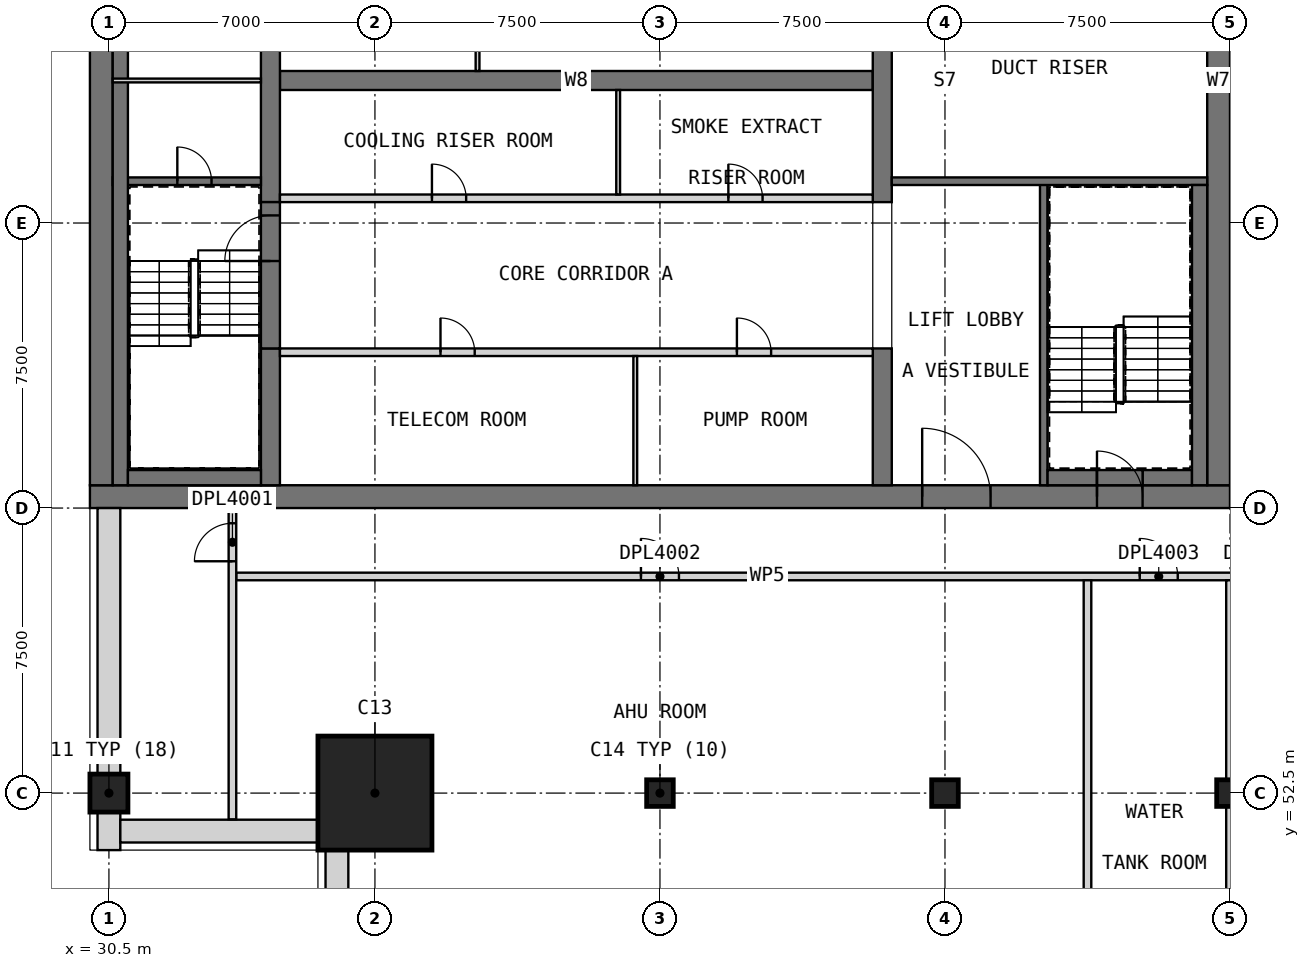
"""IFC4 building model, lengths in metres.
Left out: names, types, materials, properties, quantities, classifications, styles, units other than length and angle.
Written with IfcOpenShell. Run it as: python <this file> out.ifc"""

import sys

from ifc_helpers import new_model, si_unit, direction, frame, frame_2d, origin, origin_2d, place, context, subcontext, project, spatial, rectangle, extrude, element, fill, save


model = new_model("IFC4")
c1 = context("Model", 3, precision=1e-05, world=origin(), true_north=direction((0.0, 1.0)))
c2 = subcontext(c1, "Body", "Model", "MODEL_VIEW")
j1 = project(units=[si_unit("LENGTHUNIT", "METRE"), si_unit("PLANEANGLEUNIT", "RADIAN")], contexts=[c1])
p1 = place(None, origin())
s1 = spatial("IfcSite", under=j1, at=p1, CompositionType="ELEMENT")
p2 = place(p1, origin())
s2 = spatial("IfcBuilding", under=s1, at=p2, CompositionType="ELEMENT")
p3 = place(p2, frame((0.0, 0.0, 314.7)))
s3 = spatial("IfcBuildingStorey", under=s2, at=p3, CompositionType="ELEMENT", Elevation=314.7)
p4 = place(p3, frame((30.5, 52.5, 0.0), z_axis=(0.0, 0.0, 1.0), x_axis=(1.0, 0.0, 0.0)))
e1 = element("IfcColumn", 1, at=p4, inside=s3, PredefinedType="COLUMN", context=c2, shape_type="SweptSolid", body=[
    extrude(rectangle(XDim=1.0, YDim=1.0, at=origin_2d()), origin(), (0.0, 0.0, 1.0), 5.5),
])
for number, where, z_axis, x_axis in (
    (2, (45.0, 52.5, 0.0), (0.0, 0.0, 1.0), (1.0, 0.0, 0.0)),
    (3, (52.5, 52.5, 0.0), (0.0, 0.0, 1.0), (1.0, 0.0, 0.0)),
    (4, (60.0, 52.5, 0.0), (0.0, 0.0, 1.0), (1.0, 0.0, 0.0)),
):
    element("IfcColumn", number, at=place(p3, frame(where, z_axis=z_axis, x_axis=x_axis)), inside=s3, PredefinedType="COLUMN", context=c2, shape_type="SweptSolid", body=[
        extrude(rectangle(XDim=0.7, YDim=0.7, at=origin_2d()), origin(), (0.0, 0.0, 1.0), 5.5),
    ])
p5 = place(p3, frame((37.5, 52.5, 0.0), z_axis=(0.0, 0.0, 1.0), x_axis=(1.0, 0.0, 0.0)))
e5 = element("IfcColumn", 5, at=p5, inside=s3, PredefinedType="COLUMN", context=c2, shape_type="SweptSolid", body=[
    extrude(rectangle(XDim=3.0, YDim=3.0, at=origin_2d()), origin(), (0.0, 0.0, 1.0), 5.5),
])
p6 = place(p3, frame((30.0, 60.3, 0.0), z_axis=(0.0, 0.0, 1.0), x_axis=(1.0, 0.0, 0.0)))
e6 = element("IfcWall", 6, at=p6, inside=s3, PredefinedType="SHEAR", context=c2, shape_type="SweptSolid", body=[
    extrude(rectangle(XDim=30.0, YDim=0.6, at=frame_2d((15.0, 0.0))), origin(), (0.0, 0.0, 1.0), 5.5),
])
p7 = place(p6, frame((21.9, 0.0, 0.0)))
e7 = element("IfcOpeningElement", 7, at=p7, cuts=e6, PredefinedType="OPENING", context=c2, shape_type="SweptSolid", body=[
    extrude(rectangle(XDim=1.8, YDim=2.1, at=frame_2d((0.9, 1.05))), frame((0.0, 0.31, 0.0), z_axis=(0.0, -1.0, 0.0), x_axis=(1.0, 0.0, 0.0)), (0.0, 0.0, 1.0), 0.62),
])
p8 = place(p6, frame((26.5, 0.0, 0.0)))
e8 = element("IfcOpeningElement", 8, at=p8, cuts=e6, PredefinedType="OPENING", context=c2, shape_type="SweptSolid", body=[
    extrude(rectangle(XDim=1.2, YDim=2.1, at=frame_2d((0.6, 1.05))), frame((0.0, 0.31, 0.0), z_axis=(0.0, -1.0, 0.0), x_axis=(1.0, 0.0, 0.0)), (0.0, 0.0, 1.0), 0.62),
])
p9 = place(p3, frame((30.3, 60.6, 0.0), z_axis=(0.0, 0.0, 1.0), x_axis=(0.0, 1.0, 0.0)))
e9 = element("IfcWall", 9, at=p9, inside=s3, PredefinedType="SHEAR", context=c2, shape_type="SweptSolid", body=[
    extrude(rectangle(XDim=21.3, YDim=0.6, at=frame_2d((10.65, 0.0))), origin(), (0.0, 0.0, 1.0), 5.5),
])
p10 = place(p3, frame((59.7, 60.6, 0.0), z_axis=(0.0, 0.0, 1.0), x_axis=(0.0, 1.0, 0.0)))
e10 = element("IfcWall", 10, at=p10, inside=s3, PredefinedType="SHEAR", context=c2, shape_type="SweptSolid", body=[
    extrude(rectangle(XDim=21.3, YDim=0.6, at=frame_2d((10.65, 0.0))), origin(), (0.0, 0.0, 1.0), 5.5),
])
p11 = place(p10, frame((14.9, 0.0, 0.0)))
e11 = element("IfcOpeningElement", 11, at=p11, cuts=e10, PredefinedType="OPENING", context=c2, shape_type="SweptSolid", body=[
    extrude(rectangle(XDim=1.8, YDim=2.1, at=frame_2d((0.9, 1.05))), frame((0.0, 0.31, 0.0), z_axis=(0.0, -1.0, 0.0), x_axis=(1.0, 0.0, 0.0)), (0.0, 0.0, 1.0), 0.62),
])
p12 = place(p3, frame((35.0, 71.25, 0.0), z_axis=(0.0, 0.0, 1.0), x_axis=(1.0, 0.0, 0.0)))
e12 = element("IfcWall", 12, at=p12, inside=s3, PredefinedType="SHEAR", context=c2, shape_type="SweptSolid", body=[
    extrude(rectangle(XDim=15.6, YDim=0.5, at=frame_2d((7.8, 0.0))), origin(), (0.0, 0.0, 1.0), 5.5),
])
p13 = place(p3, frame((34.75, 60.6, 0.0), z_axis=(0.0, 0.0, 1.0), x_axis=(0.0, 1.0, 0.0)))
e13 = element("IfcWall", 13, at=p13, inside=s3, PredefinedType="SHEAR", context=c2, shape_type="SweptSolid", body=[
    extrude(rectangle(XDim=3.6, YDim=0.5, at=frame_2d((1.8, 0.0))), origin(), (0.0, 0.0, 1.0), 5.5),
])
p14 = place(p3, frame((34.75, 68.05, 0.0), z_axis=(0.0, 0.0, 1.0), x_axis=(0.0, 1.0, 0.0)))
e14 = element("IfcWall", 14, at=p14, inside=s3, PredefinedType="SHEAR", context=c2, shape_type="SweptSolid", body=[
    extrude(rectangle(XDim=6.4, YDim=0.5, at=frame_2d((3.2, 0.0))), origin(), (0.0, 0.0, 1.0), 5.5),
])
p15 = place(p3, frame((50.85, 60.6, 0.0), z_axis=(0.0, 0.0, 1.0), x_axis=(0.0, 1.0, 0.0)))
e15 = element("IfcWall", 15, at=p15, inside=s3, PredefinedType="SHEAR", context=c2, shape_type="SweptSolid", body=[
    extrude(rectangle(XDim=3.6, YDim=0.5, at=frame_2d((1.8, 0.0))), origin(), (0.0, 0.0, 1.0), 5.5),
])
p16 = place(p3, frame((50.85, 68.05, 0.0), z_axis=(0.0, 0.0, 1.0), x_axis=(0.0, 1.0, 0.0)))
e16 = element("IfcWall", 16, at=p16, inside=s3, PredefinedType="SHEAR", context=c2, shape_type="SweptSolid", body=[
    extrude(rectangle(XDim=6.4, YDim=0.5, at=frame_2d((3.2, 0.0))), origin(), (0.0, 0.0, 1.0), 5.5),
])
p17 = place(p2, frame((0.0, 0.0, 34.0)))
s4 = spatial("IfcBuildingStorey", under=s2, at=p17, CompositionType="ELEMENT", Elevation=34.0)
for number, where, z_axis, x_axis in (
    (17, (29.7, 61.05, 0.0), (0.0, 0.0, 1.0), (0.0, 1.0, 0.0)),
    (18, (29.7, 65.925, 0.0), (0.0, 0.0, 1.0), (0.0, 1.0, 0.0)),
    (19, (29.7, 70.8, 0.0), (0.0, 0.0, 1.0), (0.0, 1.0, 0.0)),
):
    element("IfcWall", number, at=place(p17, frame(where, z_axis=z_axis, x_axis=x_axis)), inside=s4, PredefinedType="SOLIDWALL", context=c2, shape_type="SweptSolid", body=[
        extrude(rectangle(XDim=0.9, YDim=0.6, at=frame_2d((0.45, 0.0))), origin(), (0.0, 0.0, 1.0), 286.2),
    ])
p18 = place(p3, frame((30.5, 60.0, 0.0), z_axis=(0.0, 0.0, 1.0), x_axis=(0.0, -1.0, 0.0)))
e20 = element("IfcWall", 20, at=p18, inside=s3, PredefinedType="ELEMENTEDWALL", context=c2, shape_type="SweptSolid", body=[
    extrude(rectangle(XDim=7.0, YDim=0.6, at=frame_2d((3.5, 0.0))), origin(), (0.0, 0.0, 1.0), 5.1),
])
p19 = place(p3, frame((30.5, 52.0, 0.0), z_axis=(0.0, 0.0, 1.0), x_axis=(0.0, -1.0, 0.0)))
e21 = element("IfcWall", 21, at=p19, inside=s3, PredefinedType="ELEMENTEDWALL", context=c2, shape_type="SweptSolid", body=[
    extrude(rectangle(XDim=1.0, YDim=0.6, at=frame_2d((0.5, 0.0))), origin(), (0.0, 0.0, 1.0), 5.1),
])
for number, where, z_axis, x_axis in (
    (22, (30.8, 51.5, 0.0), (0.0, 0.0, 1.0), (1.0, 0.0, 0.0)),
    (23, (36.5, 51.0, 0.0), (0.0, 0.0, 1.0), (0.0, -1.0, 0.0)),
):
    element("IfcWall", number, at=place(p3, frame(where, z_axis=z_axis, x_axis=x_axis)), inside=s3, PredefinedType="ELEMENTEDWALL", context=c2, shape_type="SweptSolid", body=[
        extrude(rectangle(XDim=5.2, YDim=0.6, at=frame_2d((2.6, 0.0))), origin(), (0.0, 0.0, 1.0), 5.1),
    ])
p20 = place(p3, frame((35.0, 64.1, 0.0), z_axis=(0.0, 0.0, 1.0), x_axis=(1.0, 0.0, 0.0)))
e24 = element("IfcWall", 24, at=p20, inside=s3, PredefinedType="PARTITIONING", context=c2, shape_type="SweptSolid", body=[
    extrude(rectangle(XDim=15.6, YDim=0.2, at=frame_2d((7.8, 0.0))), origin(), (0.0, 0.0, 1.0), 5.09),
])
p21 = place(p20, frame((4.225, 0.0, 0.0)))
e25 = element("IfcOpeningElement", 25, at=p21, cuts=e24, PredefinedType="OPENING", context=c2, shape_type="SweptSolid", body=[
    extrude(rectangle(XDim=0.9, YDim=2.1, at=frame_2d((0.45, 1.05))), frame((0.0, 0.11, 0.0), z_axis=(0.0, -1.0, 0.0), x_axis=(1.0, 0.0, 0.0)), (0.0, 0.0, 1.0), 0.22),
])
p22 = place(p20, frame((12.025, 0.0, 0.0)))
e26 = element("IfcOpeningElement", 26, at=p22, cuts=e24, PredefinedType="OPENING", context=c2, shape_type="SweptSolid", body=[
    extrude(rectangle(XDim=0.9, YDim=2.1, at=frame_2d((0.45, 1.05))), frame((0.0, 0.11, 0.0), z_axis=(0.0, -1.0, 0.0), x_axis=(1.0, 0.0, 0.0)), (0.0, 0.0, 1.0), 0.22),
])
p23 = place(p3, frame((44.35, 60.6, 0.0), z_axis=(0.0, 0.0, 1.0), x_axis=(0.0, 1.0, 0.0)))
e27 = element("IfcWall", 27, at=p23, inside=s3, PredefinedType="PARTITIONING", context=c2, shape_type="SweptSolid", body=[
    extrude(rectangle(XDim=3.4, YDim=0.1, at=frame_2d((1.7, 0.0))), origin(), (0.0, 0.0, 1.0), 5.09),
])
p24 = place(p3, frame((35.0, 68.15, 0.0), z_axis=(0.0, 0.0, 1.0), x_axis=(1.0, 0.0, 0.0)))
e28 = element("IfcWall", 28, at=p24, inside=s3, PredefinedType="PARTITIONING", context=c2, shape_type="SweptSolid", body=[
    extrude(rectangle(XDim=15.6, YDim=0.2, at=frame_2d((7.8, 0.0))), origin(), (0.0, 0.0, 1.0), 5.09),
])
p25 = place(p24, frame((4.0, 0.0, 0.0)))
e29 = element("IfcOpeningElement", 29, at=p25, cuts=e28, PredefinedType="OPENING", context=c2, shape_type="SweptSolid", body=[
    extrude(rectangle(XDim=0.9, YDim=2.1, at=frame_2d((0.45, 1.05))), frame((0.0, 0.11, 0.0), z_axis=(0.0, -1.0, 0.0), x_axis=(1.0, 0.0, 0.0)), (0.0, 0.0, 1.0), 0.22),
])
p26 = place(p24, frame((11.8, 0.0, 0.0)))
e30 = element("IfcOpeningElement", 30, at=p26, cuts=e28, PredefinedType="OPENING", context=c2, shape_type="SweptSolid", body=[
    extrude(rectangle(XDim=0.9, YDim=2.1, at=frame_2d((0.45, 1.05))), frame((0.0, 0.11, 0.0), z_axis=(0.0, -1.0, 0.0), x_axis=(1.0, 0.0, 0.0)), (0.0, 0.0, 1.0), 0.22),
])
p27 = place(p3, frame((43.9, 68.25, 0.0), z_axis=(0.0, 0.0, 1.0), x_axis=(0.0, 1.0, 0.0)))
e31 = element("IfcWall", 31, at=p27, inside=s3, PredefinedType="PARTITIONING", context=c2, shape_type="SweptSolid", body=[
    extrude(rectangle(XDim=2.75, YDim=0.1, at=frame_2d((1.375, 0.0))), origin(), (0.0, 0.0, 1.0), 5.09),
])
p28 = place(p3, frame((40.2, 71.5, 0.0), z_axis=(0.0, 0.0, 1.0), x_axis=(0.0, 1.0, 0.0)))
e32 = element("IfcWall", 32, at=p28, inside=s3, PredefinedType="PARTITIONING", context=c2, shape_type="SweptSolid", body=[
    extrude(rectangle(XDim=2.0, YDim=0.1, at=frame_2d((1.0, 0.0))), origin(), (0.0, 0.0, 1.0), 5.09),
])
p29 = place(p3, frame((34.75, 64.2, 0.0), z_axis=(0.0, 0.0, 1.0), x_axis=(0.0, 1.0, 0.0)))
e33 = element("IfcWall", 33, at=p29, inside=s3, PredefinedType="SOLIDWALL", context=c2, shape_type="SweptSolid", body=[
    extrude(rectangle(XDim=3.85, YDim=0.5, at=frame_2d((1.925, 0.0))), origin(), (0.0, 0.0, 1.0), 4.3),
])
p30 = place(p29, frame((2.3, 0.0, 0.0)))
e34 = element("IfcOpeningElement", 34, at=p30, cuts=e33, PredefinedType="OPENING", context=c2, shape_type="SweptSolid", body=[
    extrude(rectangle(XDim=1.2, YDim=2.1, at=frame_2d((0.6, 1.05))), frame((0.0, 0.26, 0.0), z_axis=(0.0, -1.0, 0.0), x_axis=(1.0, 0.0, 0.0)), (0.0, 0.0, 1.0), 0.52),
])
p31 = place(p3, frame((30.6, 68.6, 0.0), z_axis=(0.0, 0.0, 1.0), x_axis=(1.0, 0.0, 0.0)))
e35 = element("IfcWall", 35, at=p31, inside=s3, PredefinedType="SOLIDWALL", context=c2, shape_type="SweptSolid", body=[
    extrude(rectangle(XDim=3.9, YDim=0.2, at=frame_2d((1.95, 0.0))), origin(), (0.0, 0.0, 1.0), 5.09),
])
p32 = place(p31, frame((1.7, 0.0, 0.0)))
e36 = element("IfcOpeningElement", 36, at=p32, cuts=e35, PredefinedType="OPENING", context=c2, shape_type="SweptSolid", body=[
    extrude(rectangle(XDim=0.9, YDim=2.1, at=frame_2d((0.45, 1.05))), frame((0.0, 0.11, 0.0), z_axis=(0.0, -1.0, 0.0), x_axis=(1.0, 0.0, 0.0)), (0.0, 0.0, 1.0), 0.22),
])
p33 = place(p3, frame((55.1, 60.6, 0.0), z_axis=(0.0, 0.0, 1.0), x_axis=(0.0, 1.0, 0.0)))
e37 = element("IfcWall", 37, at=p33, inside=s3, PredefinedType="SOLIDWALL", context=c2, shape_type="SweptSolid", body=[
    extrude(rectangle(XDim=8.0, YDim=0.2, at=frame_2d((4.0, 0.0))), origin(), (0.0, 0.0, 1.0), 5.09),
])
p34 = place(p3, frame((51.1, 68.6, 0.0), z_axis=(0.0, 0.0, 1.0), x_axis=(1.0, 0.0, 0.0)))
e38 = element("IfcWall", 38, at=p34, inside=s3, PredefinedType="SOLIDWALL", context=c2, shape_type="SweptSolid", body=[
    extrude(rectangle(XDim=8.3, YDim=0.2, at=frame_2d((4.15, 0.0))), origin(), (0.0, 0.0, 1.0), 5.09),
])
p35 = place(p3, frame((30.8, 60.6, 0.0), z_axis=(0.0, 0.0, 1.0), x_axis=(0.0, 1.0, 0.0)))
e39 = element("IfcWall", 39, at=p35, inside=s3, PredefinedType="SOLIDWALL", context=c2, shape_type="SweptSolid", body=[
    extrude(rectangle(XDim=21.3, YDim=0.4, at=frame_2d((10.65, 0.0))), origin(), (0.0, 0.0, 1.0), 5.09),
])
p36 = place(p3, frame((31.0, 60.8, 0.0), z_axis=(0.0, 0.0, 1.0), x_axis=(1.0, 0.0, 0.0)))
e40 = element("IfcWall", 40, at=p36, inside=s3, PredefinedType="SOLIDWALL", context=c2, shape_type="SweptSolid", body=[
    extrude(rectangle(XDim=3.5, YDim=0.4, at=frame_2d((1.75, 0.0))), origin(), (0.0, 0.0, 1.0), 5.09),
])
for number, where, z_axis, x_axis in (
    (41, (55.2, 60.8, 0.0), (0.0, 0.0, 1.0), (1.0, 0.0, 0.0)),
    (42, (57.7, 60.8, 0.0), (0.0, 0.0, 1.0), (1.0, 0.0, 0.0)),
):
    element("IfcWall", number, at=place(p3, frame(where, z_axis=z_axis, x_axis=x_axis)), inside=s3, PredefinedType="SOLIDWALL", context=c2, shape_type="SweptSolid", body=[
        extrude(rectangle(XDim=1.3, YDim=0.4, at=frame_2d((0.65, 0.0))), origin(), (0.0, 0.0, 1.0), 5.09),
    ])
p37 = place(p3, frame((59.2, 60.6, 0.0), z_axis=(0.0, 0.0, 1.0), x_axis=(0.0, 1.0, 0.0)))
e43 = element("IfcWall", 43, at=p37, inside=s3, PredefinedType="SOLIDWALL", context=c2, shape_type="SweptSolid", body=[
    extrude(rectangle(XDim=7.9, YDim=0.4, at=frame_2d((3.95, 0.0))), origin(), (0.0, 0.0, 1.0), 5.09),
])
p38 = place(p3, frame((56.5, 60.8, 3.24), z_axis=(0.0, 0.0, 1.0), x_axis=(1.0, 0.0, 0.0)))
e44 = element("IfcWall", 44, at=p38, inside=s3, PredefinedType="SOLIDWALL", context=c2, shape_type="SweptSolid", body=[
    extrude(rectangle(XDim=1.2, YDim=0.4, at=frame_2d((0.6, 0.0))), origin(), (0.0, 0.0, 1.0), 1.85),
])
p39 = place(p3, frame((30.6, 71.25, 0.0), z_axis=(0.0, 0.0, 1.0), x_axis=(1.0, 0.0, 0.0)))
e45 = element("IfcWall", 45, at=p39, inside=s3, PredefinedType="PARTITIONING", context=c2, shape_type="SweptSolid", body=[
    extrude(rectangle(XDim=3.9, YDim=0.1, at=frame_2d((1.95, 0.0))), origin(), (0.0, 0.0, 1.0), 5.09),
])
p40 = place(p3, frame((33.85, 58.2, 0.0), z_axis=(0.0, 0.0, 1.0), x_axis=(1.0, 0.0, 0.0)))
e46 = element("IfcWall", 46, at=p40, inside=s3, PredefinedType="PARTITIONING", context=c2, shape_type="SweptSolid", body=[
    extrude(rectangle(XDim=27.95, YDim=0.2, at=frame_2d((13.975, 0.0))), origin(), (0.0, 0.0, 1.0), 5.1),
])
p41 = place(p40, frame((10.65, 0.0, 0.0)))
e47 = element("IfcOpeningElement", 47, at=p41, cuts=e46, PredefinedType="OPENING", context=c2, shape_type="SweptSolid", body=[
    extrude(rectangle(XDim=1.0, YDim=2.1, at=frame_2d((0.5, 1.05))), frame((0.0, 0.11, 0.0), z_axis=(0.0, -1.0, 0.0), x_axis=(1.0, 0.0, 0.0)), (0.0, 0.0, 1.0), 0.22),
])
p42 = place(p40, frame((23.775, 0.0, 0.0)))
e48 = element("IfcOpeningElement", 48, at=p42, cuts=e46, PredefinedType="OPENING", context=c2, shape_type="SweptSolid", body=[
    extrude(rectangle(XDim=1.0, YDim=2.1, at=frame_2d((0.5, 1.05))), frame((0.0, 0.11, 0.0), z_axis=(0.0, -1.0, 0.0), x_axis=(1.0, 0.0, 0.0)), (0.0, 0.0, 1.0), 0.22),
])
p43 = place(p40, frame((26.55, 0.0, 0.0)))
e49 = element("IfcOpeningElement", 49, at=p43, cuts=e46, PredefinedType="OPENING", context=c2, shape_type="SweptSolid", body=[
    extrude(rectangle(XDim=1.0, YDim=2.1, at=frame_2d((0.5, 1.05))), frame((0.0, 0.11, 0.0), z_axis=(0.0, -1.0, 0.0), x_axis=(1.0, 0.0, 0.0)), (0.0, 0.0, 1.0), 0.22),
])
p44 = place(p3, frame((33.75, 51.81, 0.0), z_axis=(0.0, 0.0, 1.0), x_axis=(0.0, 1.0, 0.0)))
e50 = element("IfcWall", 50, at=p44, inside=s3, PredefinedType="PARTITIONING", context=c2, shape_type="SweptSolid", body=[
    extrude(rectangle(XDim=8.19, YDim=0.2, at=frame_2d((4.095, 0.0))), origin(), (0.0, 0.0, 1.0), 5.1),
])
p45 = place(p44, frame((6.79, 0.0, 0.0)))
e51 = element("IfcOpeningElement", 51, at=p45, cuts=e50, PredefinedType="OPENING", context=c2, shape_type="SweptSolid", body=[
    extrude(rectangle(XDim=1.0, YDim=2.1, at=frame_2d((0.5, 1.05))), frame((0.0, 0.11, 0.0), z_axis=(0.0, -1.0, 0.0), x_axis=(1.0, 0.0, 0.0)), (0.0, 0.0, 1.0), 0.22),
])
p46 = place(p3, frame((56.25, 45.81, 0.0), z_axis=(0.0, 0.0, 1.0), x_axis=(0.0, 1.0, 0.0)))
e52 = element("IfcWall", 52, at=p46, inside=s3, PredefinedType="PARTITIONING", context=c2, shape_type="SweptSolid", body=[
    extrude(rectangle(XDim=12.29, YDim=0.2, at=frame_2d((6.145, 0.0))), origin(), (0.0, 0.0, 1.0), 5.1),
])
p47 = place(p3, frame((60.0, 45.0, 0.0), z_axis=(0.0, 0.0, 1.0), x_axis=(0.0, 1.0, 0.0)))
e53 = element("IfcWall", 53, at=p47, inside=s3, PredefinedType="PARTITIONING", context=c2, shape_type="SweptSolid", body=[
    extrude(rectangle(XDim=13.1, YDim=0.2, at=frame_2d((6.55, 0.0))), origin(), (0.0, 0.0, 1.0), 5.1),
])
p48 = place(p21, origin())
e54 = element("IfcDoor", 54, at=p48, inside=s3, OperationType="SINGLE_SWING_LEFT", PredefinedType="DOOR", context=c2, shape_type="SweptSolid", body=[
    extrude(rectangle(XDim=0.9, YDim=2.1, at=frame_2d((0.45, 1.05))), frame((0.0, 0.025, 0.0), z_axis=(0.0, -1.0, 0.0), x_axis=(1.0, 0.0, 0.0)), (0.0, 0.0, 1.0), 0.05),
])
fill(e25, e54)
p49 = place(p22, origin())
e55 = element("IfcDoor", 55, at=p49, inside=s3, OperationType="SINGLE_SWING_RIGHT", PredefinedType="DOOR", context=c2, shape_type="SweptSolid", body=[
    extrude(rectangle(XDim=0.9, YDim=2.1, at=frame_2d((0.45, 1.05))), frame((0.0, 0.025, 0.0), z_axis=(0.0, -1.0, 0.0), x_axis=(1.0, 0.0, 0.0)), (0.0, 0.0, 1.0), 0.05),
])
fill(e26, e55)
p50 = place(p25, origin())
e56 = element("IfcDoor", 56, at=p50, inside=s3, OperationType="SINGLE_SWING_LEFT", PredefinedType="DOOR", context=c2, shape_type="SweptSolid", body=[
    extrude(rectangle(XDim=0.9, YDim=2.1, at=frame_2d((0.45, 1.05))), frame((0.0, 0.025, 0.0), z_axis=(0.0, -1.0, 0.0), x_axis=(1.0, 0.0, 0.0)), (0.0, 0.0, 1.0), 0.05),
])
fill(e29, e56)
p51 = place(p26, origin())
e57 = element("IfcDoor", 57, at=p51, inside=s3, OperationType="SINGLE_SWING_RIGHT", PredefinedType="DOOR", context=c2, shape_type="SweptSolid", body=[
    extrude(rectangle(XDim=0.9, YDim=2.1, at=frame_2d((0.45, 1.05))), frame((0.0, 0.025, 0.0), z_axis=(0.0, -1.0, 0.0), x_axis=(1.0, 0.0, 0.0)), (0.0, 0.0, 1.0), 0.05),
])
fill(e30, e57)
p52 = place(p7, origin())
e58 = element("IfcDoor", 58, at=p52, inside=s3, OperationType="DOUBLE_DOOR_SINGLE_SWING", PredefinedType="DOOR", context=c2, shape_type="SweptSolid", body=[
    extrude(rectangle(XDim=1.8, YDim=2.1, at=frame_2d((0.9, 1.05))), frame((0.0, 0.025, 0.0), z_axis=(0.0, -1.0, 0.0), x_axis=(1.0, 0.0, 0.0)), (0.0, 0.0, 1.0), 0.05),
])
fill(e7, e58)
p53 = place(p30, origin())
e59 = element("IfcDoor", 59, at=p53, inside=s3, OperationType="SINGLE_SWING_LEFT", PredefinedType="DOOR", context=c2, shape_type="SweptSolid", body=[
    extrude(rectangle(XDim=1.2, YDim=2.1, at=frame_2d((0.6, 1.05))), frame((0.0, 0.025, 0.0), z_axis=(0.0, -1.0, 0.0), x_axis=(1.0, 0.0, 0.0)), (0.0, 0.0, 1.0), 0.05),
])
fill(e34, e59)
p54 = place(p32, origin())
e60 = element("IfcDoor", 60, at=p54, inside=s3, OperationType="SINGLE_SWING_LEFT", PredefinedType="DOOR", context=c2, shape_type="SweptSolid", body=[
    extrude(rectangle(XDim=0.9, YDim=2.1, at=frame_2d((0.45, 1.05))), frame((0.0, 0.025, 0.0), z_axis=(0.0, -1.0, 0.0), x_axis=(1.0, 0.0, 0.0)), (0.0, 0.0, 1.0), 0.05),
])
fill(e36, e60)
p55 = place(p8, origin())
e61 = element("IfcDoor", 61, at=p55, inside=s3, OperationType="SINGLE_SWING_LEFT", PredefinedType="DOOR", context=c2, shape_type="SweptSolid", body=[
    extrude(rectangle(XDim=1.2, YDim=2.1, at=frame_2d((0.6, 1.05))), frame((0.0, 0.025, 0.0), z_axis=(0.0, -1.0, 0.0), x_axis=(1.0, 0.0, 0.0)), (0.0, 0.0, 1.0), 0.05),
])
fill(e8, e61)
p56 = place(p45, origin())
e62 = element("IfcDoor", 62, at=p56, inside=s3, OperationType="SINGLE_SWING_RIGHT", PredefinedType="DOOR", context=c2, shape_type="SweptSolid", body=[
    extrude(rectangle(XDim=1.0, YDim=2.1, at=frame_2d((0.5, 1.05))), frame((0.0, 0.025, 0.0), z_axis=(0.0, -1.0, 0.0), x_axis=(1.0, 0.0, 0.0)), (0.0, 0.0, 1.0), 0.05),
])
fill(e51, e62)
p57 = place(p41, origin())
e63 = element("IfcDoor", 63, at=p57, inside=s3, OperationType="SINGLE_SWING_RIGHT", PredefinedType="DOOR", context=c2, shape_type="SweptSolid", body=[
    extrude(rectangle(XDim=1.0, YDim=2.1, at=frame_2d((0.5, 1.05))), frame((0.0, 0.025, 0.0), z_axis=(0.0, -1.0, 0.0), x_axis=(1.0, 0.0, 0.0)), (0.0, 0.0, 1.0), 0.05),
])
fill(e47, e63)
p58 = place(p42, origin())
e64 = element("IfcDoor", 64, at=p58, inside=s3, OperationType="SINGLE_SWING_RIGHT", PredefinedType="DOOR", context=c2, shape_type="SweptSolid", body=[
    extrude(rectangle(XDim=1.0, YDim=2.1, at=frame_2d((0.5, 1.05))), frame((0.0, 0.025, 0.0), z_axis=(0.0, -1.0, 0.0), x_axis=(1.0, 0.0, 0.0)), (0.0, 0.0, 1.0), 0.05),
])
fill(e48, e64)
save(model, sys.argv[1])
